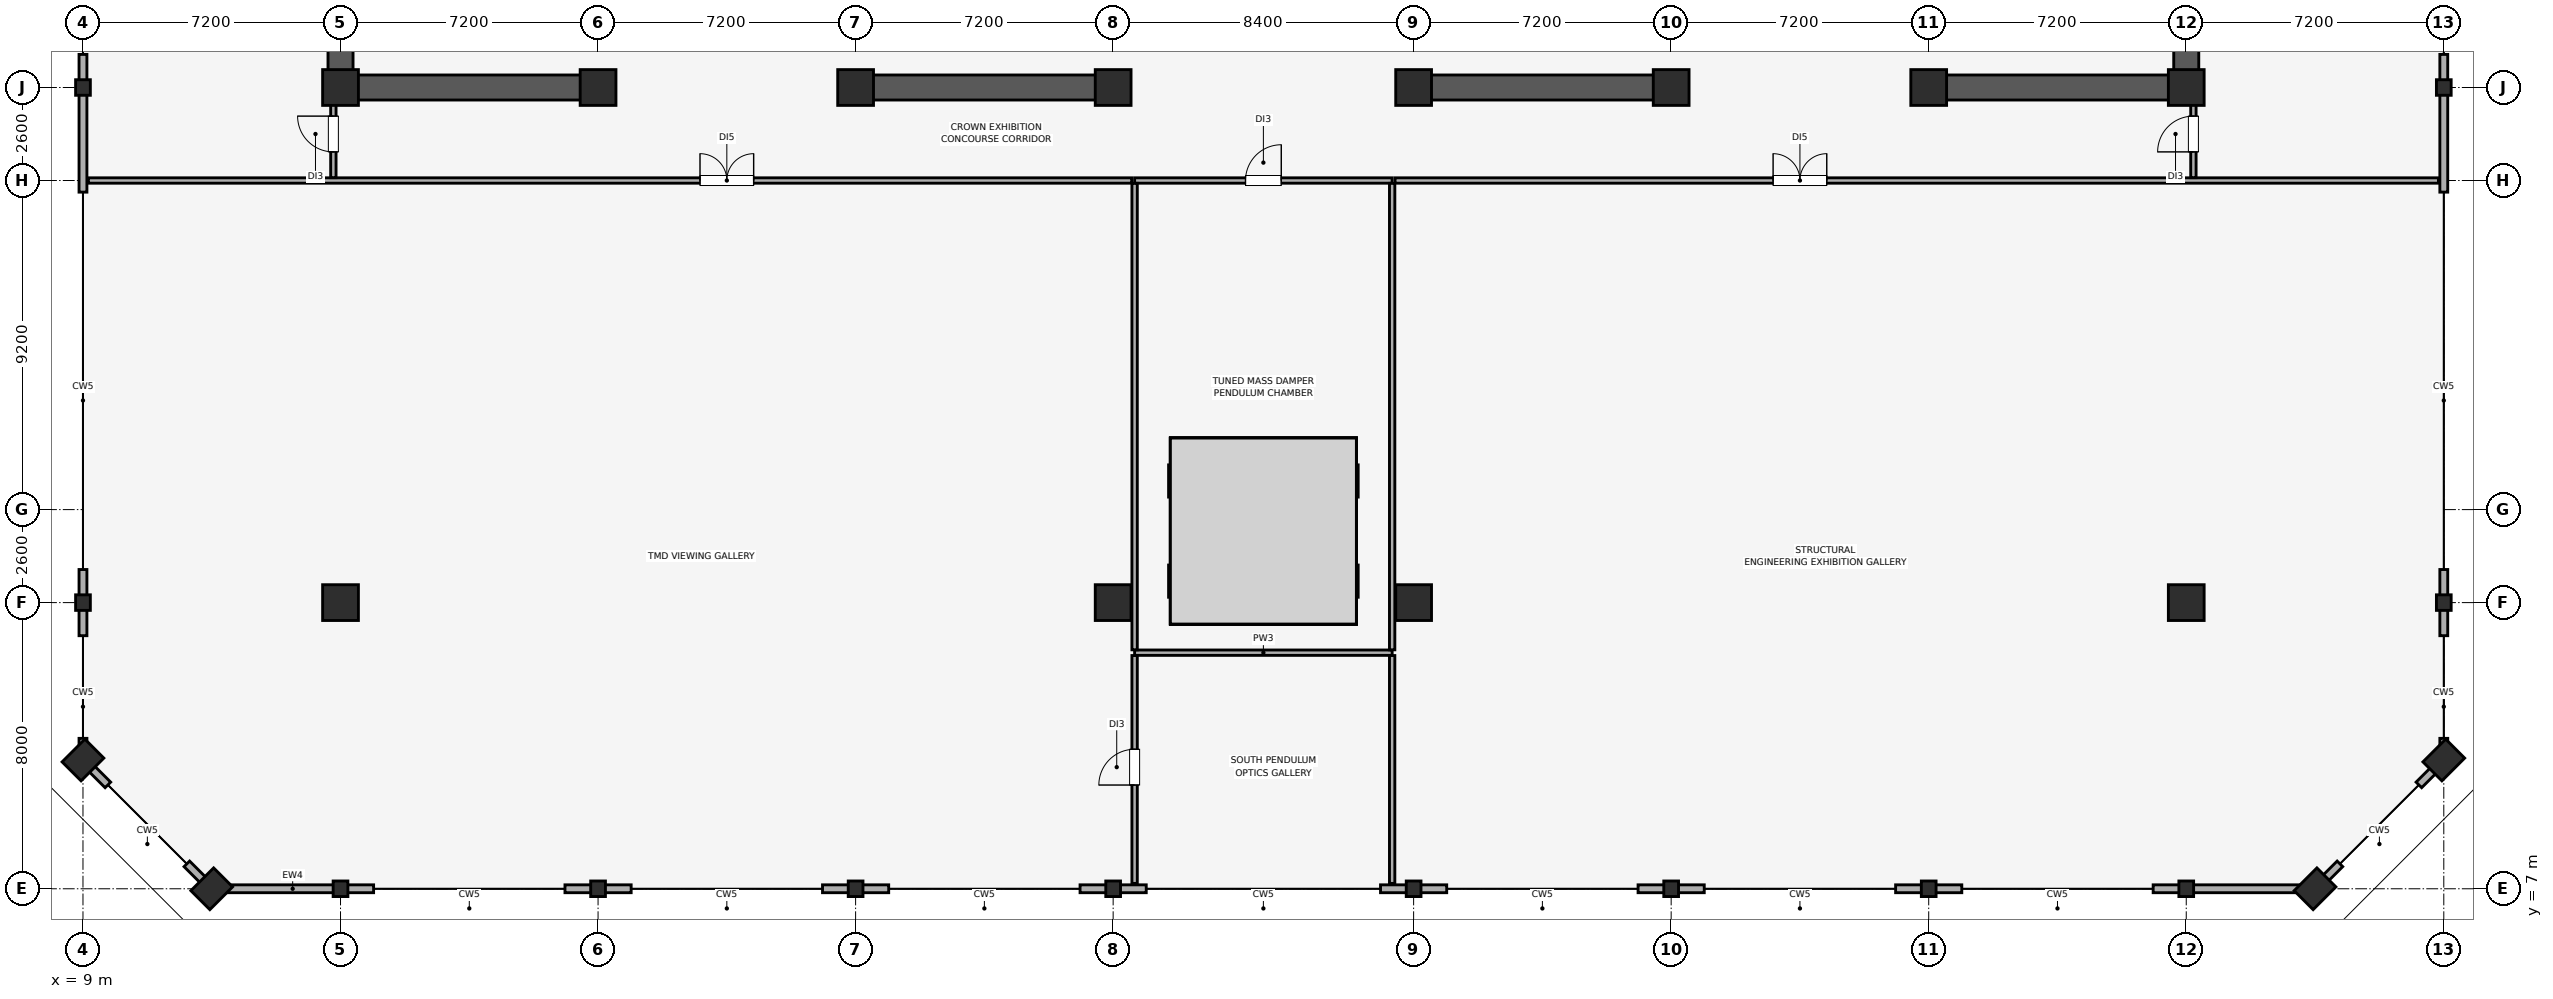
"""IFC4 building model, lengths in metres.
Left out: names, types, materials, properties, quantities, classifications, styles, units other than length and angle.
Written with IfcOpenShell. Run it as: python <this file> out.ifc"""

import sys

from ifc_helpers import new_model, si_unit, direction, frame, frame_2d, origin, origin_2d, place, context, subcontext, project, spatial, rectangle, i_section, extrude, element, fill, save


model = new_model("IFC4")
c1 = context("Model", 3, precision=1e-05, world=origin(), true_north=direction((0.0, 1.0)))
c2 = subcontext(c1, "Body", "Model", "MODEL_VIEW")
j1 = project(units=[si_unit("LENGTHUNIT", "METRE"), si_unit("PLANEANGLEUNIT", "RADIAN")], contexts=[c1])
p1 = place(None, origin())
s1 = spatial("IfcSite", under=j1, at=p1, CompositionType="ELEMENT")
p2 = place(p1, origin())
s2 = spatial("IfcBuilding", under=s1, at=p2, CompositionType="ELEMENT")
p3 = place(p2, frame((0.0, 0.0, 294.7)))
s3 = spatial("IfcBuildingStorey", under=s2, at=p3, CompositionType="ELEMENT", Elevation=294.7)
for number, where, z_axis, x_axis in (
    (1, (16.2, 7.0, 0.0), (0.0, 0.0, 1.0), (1.0, 0.0, 0.0)),
    (2, (23.4, 7.0, 0.0), (0.0, 0.0, 1.0), (1.0, 0.0, 0.0)),
    (3, (30.6, 7.0, 0.0), (0.0, 0.0, 1.0), (1.0, 0.0, 0.0)),
    (4, (37.8, 7.0, 0.0), (0.0, 0.0, 1.0), (1.0, 0.0, 0.0)),
    (5, (46.2, 7.0, 0.0), (0.0, 0.0, 1.0), (1.0, 0.0, 0.0)),
    (6, (53.4, 7.0, 0.0), (0.0, 0.0, 1.0), (1.0, 0.0, 0.0)),
    (7, (60.6, 7.0, 0.0), (0.0, 0.0, 1.0), (1.0, 0.0, 0.0)),
    (8, (67.8, 7.0, 0.0), (0.0, 0.0, 1.0), (1.0, 0.0, 0.0)),
    (9, (9.0, 15.0, 0.0), (0.0, 0.0, 1.0), (1.0, 0.0, 0.0)),
    (10, (75.0, 15.0, 0.0), (0.0, 0.0, 1.0), (1.0, 0.0, 0.0)),
    (11, (9.0, 29.4, 0.0), (0.0, 0.0, 1.0), (1.0, 0.0, 0.0)),
    (12, (75.0, 29.4, 0.0), (0.0, 0.0, 1.0), (1.0, 0.0, 0.0)),
):
    element("IfcColumn", number, at=place(p3, frame(where, z_axis=z_axis, x_axis=x_axis)), inside=s3, PredefinedType="COLUMN", context=c2, shape_type="SweptSolid", body=[
        extrude(i_section(OverallWidth=0.412, OverallDepth=0.435, WebThickness=0.036, FlangeThickness=0.056, FilletRadius=0.015, at=origin_2d()), origin(), (0.0, 0.0, 1.0), 5.12),
    ])
for number, where, z_axis, x_axis in (
    (13, (12.6, 7.0, 0.0), (0.0, 0.0, 1.0), (0.707, 0.707, 0.0)),
    (14, (71.4, 7.0, 0.0), (0.0, 0.0, 1.0), (0.707, 0.707, 0.0)),
    (15, (75.0, 10.6, 0.0), (0.0, 0.0, 1.0), (0.707, 0.707, 0.0)),
    (16, (9.0, 10.6, 0.0), (0.0, 0.0, 1.0), (0.707, 0.707, 0.0)),
):
    element("IfcColumn", number, at=place(p3, frame(where, z_axis=z_axis, x_axis=x_axis)), inside=s3, PredefinedType="PILASTER", context=c2, shape_type="SweptSolid", body=[
        extrude(rectangle(XDim=0.9, YDim=0.75, at=origin_2d()), origin(), (0.0, 0.0, 1.0), 5.12),
    ])
for number, where, z_axis, x_axis in (
    (17, (16.2, 15.0, 0.0), (0.0, 0.0, 1.0), (1.0, 0.0, 0.0)),
    (18, (37.8, 15.0, 0.0), (0.0, 0.0, 1.0), (1.0, 0.0, 0.0)),
    (19, (46.2, 15.0, 0.0), (0.0, 0.0, 1.0), (1.0, 0.0, 0.0)),
    (20, (67.8, 15.0, 0.0), (0.0, 0.0, 1.0), (1.0, 0.0, 0.0)),
    (21, (16.2, 29.4, 0.0), (0.0, 0.0, 1.0), (1.0, 0.0, 0.0)),
    (22, (23.4, 29.4, 0.0), (0.0, 0.0, 1.0), (1.0, 0.0, 0.0)),
    (23, (30.6, 29.4, 0.0), (0.0, 0.0, 1.0), (1.0, 0.0, 0.0)),
    (24, (37.8, 29.4, 0.0), (0.0, 0.0, 1.0), (1.0, 0.0, 0.0)),
    (25, (46.2, 29.4, 0.0), (0.0, 0.0, 1.0), (1.0, 0.0, 0.0)),
    (26, (53.4, 29.4, 0.0), (0.0, 0.0, 1.0), (1.0, 0.0, 0.0)),
    (27, (60.6, 29.4, 0.0), (0.0, 0.0, 1.0), (1.0, 0.0, 0.0)),
    (28, (67.8, 29.4, 0.0), (0.0, 0.0, 1.0), (1.0, 0.0, 0.0)),
):
    element("IfcColumn", number, at=place(p3, frame(where, z_axis=z_axis, x_axis=x_axis)), inside=s3, PredefinedType="COLUMN", context=c2, shape_type="SweptSolid", body=[
        extrude(rectangle(XDim=1.0, YDim=1.0, at=origin_2d()), origin(), (0.0, 0.0, 1.0), 5.12),
    ])
p4 = place(p3, frame((12.6, 7.0, 0.0), z_axis=(0.0, 0.0, 1.0), x_axis=(1.0, 0.0, 0.0)))
e29 = element("IfcWall", 29, at=p4, inside=s3, PredefinedType="SOLIDWALL", context=c2, shape_type="SweptSolid", body=[
    extrude(rectangle(XDim=4.525, YDim=0.22, at=frame_2d((2.262, 0.0))), origin(), (0.0, 0.0, 1.0), 4.32),
])
for number, where, z_axis, x_axis in (
    (30, (22.475, 7.0, 0.0), (0.0, 0.0, 1.0), (1.0, 0.0, 0.0)),
    (31, (29.675, 7.0, 0.0), (0.0, 0.0, 1.0), (1.0, 0.0, 0.0)),
):
    element("IfcWall", number, at=place(p3, frame(where, z_axis=z_axis, x_axis=x_axis)), inside=s3, PredefinedType="SOLIDWALL", context=c2, shape_type="SweptSolid", body=[
        extrude(rectangle(XDim=1.85, YDim=0.22, at=frame_2d((0.925, 0.0))), origin(), (0.0, 0.0, 1.0), 4.32),
    ])
for number, where, z_axis, x_axis in (
    (32, (36.875, 7.0, 0.0), (0.0, 0.0, 1.0), (1.0, 0.0, 0.0)),
    (33, (45.275, 7.0, 0.0), (0.0, 0.0, 1.0), (1.0, 0.0, 0.0)),
):
    element("IfcWall", number, at=place(p3, frame(where, z_axis=z_axis, x_axis=x_axis)), inside=s3, PredefinedType="SOLIDWALL", context=c2, shape_type="SweptSolid", body=[
        extrude(rectangle(XDim=1.85, YDim=0.22, at=frame_2d((0.925, 0.0))), origin(), (0.0, 0.0, 1.0), 4.32),
    ])
for number, where, z_axis, x_axis in (
    (34, (52.475, 7.0, 0.0), (0.0, 0.0, 1.0), (1.0, 0.0, 0.0)),
    (35, (59.675, 7.0, 0.0), (0.0, 0.0, 1.0), (1.0, 0.0, 0.0)),
):
    element("IfcWall", number, at=place(p3, frame(where, z_axis=z_axis, x_axis=x_axis)), inside=s3, PredefinedType="SOLIDWALL", context=c2, shape_type="SweptSolid", body=[
        extrude(rectangle(XDim=1.85, YDim=0.22, at=frame_2d((0.925, 0.0))), origin(), (0.0, 0.0, 1.0), 4.32),
    ])
p5 = place(p3, frame((66.875, 7.0, 0.0), z_axis=(0.0, 0.0, 1.0), x_axis=(1.0, 0.0, 0.0)))
e36 = element("IfcWall", 36, at=p5, inside=s3, PredefinedType="SOLIDWALL", context=c2, shape_type="SweptSolid", body=[
    extrude(rectangle(XDim=4.525, YDim=0.22, at=frame_2d((2.262, 0.0))), origin(), (0.0, 0.0, 1.0), 4.32),
])
for number, where, z_axis, x_axis in (
    (37, (71.4, 7.0, 0.0), (0.0, 0.0, 1.0), (0.707, 0.707, 0.0)),
    (38, (74.303, 9.904, 0.0), (0.0, 0.0, 1.0), (0.707, 0.707, 0.0)),
):
    element("IfcWall", number, at=place(p3, frame(where, z_axis=z_axis, x_axis=x_axis)), inside=s3, PredefinedType="SOLIDWALL", context=c2, shape_type="SweptSolid", body=[
        extrude(rectangle(XDim=0.985, YDim=0.22, at=frame_2d((0.493, 0.0))), origin(), (0.0, 0.0, 1.0), 4.32),
    ])
p6 = place(p3, frame((75.0, 10.6, 0.0), z_axis=(0.0, 0.0, 1.0), x_axis=(0.0, 1.0, 0.0)))
e39 = element("IfcWall", 39, at=p6, inside=s3, PredefinedType="SOLIDWALL", context=c2, shape_type="SweptSolid", body=[
    extrude(rectangle(XDim=0.605, YDim=0.22, at=frame_2d((0.302, 0.0))), origin(), (0.0, 0.0, 1.0), 5.12),
])
p7 = place(p3, frame((75.0, 14.075, 0.0), z_axis=(0.0, 0.0, 1.0), x_axis=(0.0, 1.0, 0.0)))
e40 = element("IfcWall", 40, at=p7, inside=s3, PredefinedType="SOLIDWALL", context=c2, shape_type="SweptSolid", body=[
    extrude(rectangle(XDim=1.85, YDim=0.22, at=frame_2d((0.925, 0.0))), origin(), (0.0, 0.0, 1.0), 4.32),
])
for number, where, z_axis, x_axis in (
    (41, (75.0, 26.475, 0.0), (0.0, 0.0, 1.0), (0.0, 1.0, 0.0)),
    (42, (9.0, 30.325, 0.0), (0.0, 0.0, 1.0), (0.0, -1.0, 0.0)),
):
    element("IfcWall", number, at=place(p3, frame(where, z_axis=z_axis, x_axis=x_axis)), inside=s3, PredefinedType="SOLIDWALL", context=c2, shape_type="SweptSolid", body=[
        extrude(rectangle(XDim=3.85, YDim=0.22, at=frame_2d((1.925, 0.0))), origin(), (0.0, 0.0, 1.0), 4.32),
    ])
p8 = place(p3, frame((9.0, 15.925, 0.0), z_axis=(0.0, 0.0, 1.0), x_axis=(0.0, -1.0, 0.0)))
e43 = element("IfcWall", 43, at=p8, inside=s3, PredefinedType="SOLIDWALL", context=c2, shape_type="SweptSolid", body=[
    extrude(rectangle(XDim=1.85, YDim=0.22, at=frame_2d((0.925, 0.0))), origin(), (0.0, 0.0, 1.0), 4.32),
])
p9 = place(p3, frame((9.0, 11.205, 0.0), z_axis=(0.0, 0.0, 1.0), x_axis=(0.0, -1.0, 0.0)))
e44 = element("IfcWall", 44, at=p9, inside=s3, PredefinedType="SOLIDWALL", context=c2, shape_type="SweptSolid", body=[
    extrude(rectangle(XDim=0.605, YDim=0.22, at=frame_2d((0.302, 0.0))), origin(), (0.0, 0.0, 1.0), 5.12),
])
for number, where, z_axis, x_axis in (
    (45, (9.0, 10.6, 0.0), (0.0, 0.0, 1.0), (0.707, -0.707, 0.0)),
    (46, (11.904, 7.697, 0.0), (0.0, 0.0, 1.0), (0.707, -0.707, 0.0)),
):
    element("IfcWall", number, at=place(p3, frame(where, z_axis=z_axis, x_axis=x_axis)), inside=s3, PredefinedType="SOLIDWALL", context=c2, shape_type="SweptSolid", body=[
        extrude(rectangle(XDim=0.985, YDim=0.22, at=frame_2d((0.493, 0.0))), origin(), (0.0, 0.0, 1.0), 4.32),
    ])
for number, where, z_axis, x_axis in (
    (47, (16.2, 29.4, 0.0), (0.0, 0.0, 1.0), (0.0, 1.0, 0.0)),
    (48, (67.8, 29.4, 0.0), (0.0, 0.0, 1.0), (0.0, 1.0, 0.0)),
):
    element("IfcWall", number, at=place(p3, frame(where, z_axis=z_axis, x_axis=x_axis)), inside=s3, PredefinedType="SHEAR", context=c2, shape_type="SweptSolid", body=[
        extrude(rectangle(XDim=19.2, YDim=0.7, at=frame_2d((9.6, 0.0))), origin(), (0.0, 0.0, 1.0), 5.12),
    ])
p10 = place(p3, frame((16.555, 29.4, 0.0), z_axis=(0.0, 0.0, 1.0), x_axis=(1.0, 0.0, 0.0)))
e49 = element("IfcWall", 49, at=p10, inside=s3, PredefinedType="SHEAR", context=c2, shape_type="SweptSolid", body=[
    extrude(rectangle(XDim=7.045, YDim=0.7, at=frame_2d((3.522, 0.0))), origin(), (0.0, 0.0, 1.0), 5.12),
])
for number, where, z_axis, x_axis in (
    (50, (30.4, 29.4, 0.0), (0.0, 0.0, 1.0), (1.0, 0.0, 0.0)),
    (51, (46.0, 29.4, 0.0), (0.0, 0.0, 1.0), (1.0, 0.0, 0.0)),
):
    element("IfcWall", number, at=place(p3, frame(where, z_axis=z_axis, x_axis=x_axis)), inside=s3, PredefinedType="SHEAR", context=c2, shape_type="SweptSolid", body=[
        extrude(rectangle(XDim=7.6, YDim=0.7, at=frame_2d((3.8, 0.0))), origin(), (0.0, 0.0, 1.0), 5.12),
    ])
p11 = place(p3, frame((60.4, 29.4, 0.0), z_axis=(0.0, 0.0, 1.0), x_axis=(1.0, 0.0, 0.0)))
e52 = element("IfcWall", 52, at=p11, inside=s3, PredefinedType="SHEAR", context=c2, shape_type="SweptSolid", body=[
    extrude(rectangle(XDim=7.045, YDim=0.7, at=frame_2d((3.522, 0.0))), origin(), (0.0, 0.0, 1.0), 5.12),
])
p12 = place(p3, frame((38.4, 13.6, 0.0), z_axis=(0.0, 0.0, 1.0), x_axis=(1.0, 0.0, 0.0)))
e53 = element("IfcWall", 53, at=p12, inside=s3, PredefinedType="PARTITIONING", context=c2, shape_type="SweptSolid", body=[
    extrude(rectangle(XDim=7.2, YDim=0.15, at=frame_2d((3.6, 0.0))), origin(), (0.0, 0.0, 1.0), 5.12),
])
p13 = place(p3, frame((38.4, 26.8, 0.0), z_axis=(0.0, 0.0, 1.0), x_axis=(1.0, 0.0, 0.0)))
e54 = element("IfcWall", 54, at=p13, inside=s3, PredefinedType="PARTITIONING", context=c2, shape_type="SweptSolid", body=[
    extrude(rectangle(XDim=7.2, YDim=0.15, at=frame_2d((3.6, 0.0))), origin(), (0.0, 0.0, 1.0), 5.12),
])
p14 = place(p13, frame((3.1, 0.0, 0.0)))
e55 = element("IfcOpeningElement", 55, at=p14, cuts=e54, PredefinedType="OPENING", context=c2, shape_type="SweptSolid", body=[
    extrude(rectangle(XDim=1.0, YDim=2.15, at=frame_2d((0.5, 1.075))), frame((0.0, 0.085, 0.0), z_axis=(0.0, -1.0, 0.0), x_axis=(1.0, 0.0, 0.0)), (0.0, 0.0, 1.0), 0.17),
])
for number, where, z_axis, x_axis in (
    (56, (38.4, 13.68, 0.0), (0.0, 0.0, 1.0), (0.0, 1.0, 0.0)),
    (57, (45.6, 13.68, 0.0), (0.0, 0.0, 1.0), (0.0, 1.0, 0.0)),
):
    element("IfcWall", number, at=place(p3, frame(where, z_axis=z_axis, x_axis=x_axis)), inside=s3, PredefinedType="PARTITIONING", context=c2, shape_type="SweptSolid", body=[
        extrude(rectangle(XDim=13.04, YDim=0.15, at=frame_2d((6.52, 0.0))), origin(), (0.0, 0.0, 1.0), 5.12),
    ])
p15 = place(p3, frame((9.15, 26.8, 0.0), z_axis=(0.0, 0.0, 1.0), x_axis=(1.0, 0.0, 0.0)))
e58 = element("IfcWall", 58, at=p15, inside=s3, PredefinedType="PARTITIONING", context=c2, shape_type="SweptSolid", body=[
    extrude(rectangle(XDim=29.17, YDim=0.15, at=frame_2d((14.585, 0.0))), origin(), (0.0, 0.0, 1.0), 5.12),
])
p16 = place(p15, frame((17.1, 0.0, 0.0)))
e59 = element("IfcOpeningElement", 59, at=p16, cuts=e58, PredefinedType="OPENING", context=c2, shape_type="SweptSolid", body=[
    extrude(rectangle(XDim=1.5, YDim=2.25, at=frame_2d((0.75, 1.125))), frame((0.0, 0.085, 0.0), z_axis=(0.0, -1.0, 0.0), x_axis=(1.0, 0.0, 0.0)), (0.0, 0.0, 1.0), 0.17),
])
p17 = place(p3, frame((38.4, 7.15, 0.0), z_axis=(0.0, 0.0, 1.0), x_axis=(0.0, 1.0, 0.0)))
e60 = element("IfcWall", 60, at=p17, inside=s3, PredefinedType="PARTITIONING", context=c2, shape_type="SweptSolid", body=[
    extrude(rectangle(XDim=6.37, YDim=0.15, at=frame_2d((3.185, 0.0))), origin(), (0.0, 0.0, 1.0), 5.12),
])
p18 = place(p17, frame((2.75, 0.0, 0.0)))
e61 = element("IfcOpeningElement", 61, at=p18, cuts=e60, PredefinedType="OPENING", context=c2, shape_type="SweptSolid", body=[
    extrude(rectangle(XDim=1.0, YDim=2.15, at=frame_2d((0.5, 1.075))), frame((0.0, 0.085, 0.0), z_axis=(0.0, -1.0, 0.0), x_axis=(1.0, 0.0, 0.0)), (0.0, 0.0, 1.0), 0.17),
])
p19 = place(p3, frame((45.6, 7.15, 0.0), z_axis=(0.0, 0.0, 1.0), x_axis=(0.0, 1.0, 0.0)))
e62 = element("IfcWall", 62, at=p19, inside=s3, PredefinedType="PARTITIONING", context=c2, shape_type="SweptSolid", body=[
    extrude(rectangle(XDim=6.37, YDim=0.15, at=frame_2d((3.185, 0.0))), origin(), (0.0, 0.0, 1.0), 5.12),
])
p20 = place(p3, frame((45.68, 26.8, 0.0), z_axis=(0.0, 0.0, 1.0), x_axis=(1.0, 0.0, 0.0)))
e63 = element("IfcWall", 63, at=p20, inside=s3, PredefinedType="PARTITIONING", context=c2, shape_type="SweptSolid", body=[
    extrude(rectangle(XDim=29.17, YDim=0.15, at=frame_2d((14.585, 0.0))), origin(), (0.0, 0.0, 1.0), 5.12),
])
p21 = place(p20, frame((10.57, 0.0, 0.0)))
e64 = element("IfcOpeningElement", 64, at=p21, cuts=e63, PredefinedType="OPENING", context=c2, shape_type="SweptSolid", body=[
    extrude(rectangle(XDim=1.5, YDim=2.25, at=frame_2d((0.75, 1.125))), frame((0.0, 0.085, 0.0), z_axis=(0.0, -1.0, 0.0), x_axis=(1.0, 0.0, 0.0)), (0.0, 0.0, 1.0), 0.17),
])
p22 = place(p3, frame((16.0, 26.88, 0.0), z_axis=(0.0, 0.0, 1.0), x_axis=(0.0, 1.0, 0.0)))
e65 = element("IfcWall", 65, at=p22, inside=s3, PredefinedType="PARTITIONING", context=c2, shape_type="SweptSolid", body=[
    extrude(rectangle(XDim=2.51, YDim=0.15, at=frame_2d((1.255, 0.0))), origin(), (0.0, 0.0, 1.0), 4.76),
])
p23 = place(p22, frame((0.72, 0.0, 0.0)))
e66 = element("IfcOpeningElement", 66, at=p23, cuts=e65, PredefinedType="OPENING", context=c2, shape_type="SweptSolid", body=[
    extrude(rectangle(XDim=1.0, YDim=2.15, at=frame_2d((0.5, 1.075))), frame((0.0, 0.085, 0.0), z_axis=(0.0, -1.0, 0.0), x_axis=(1.0, 0.0, 0.0)), (0.0, 0.0, 1.0), 0.17),
])
p24 = place(p3, frame((68.0, 26.88, 0.0), z_axis=(0.0, 0.0, 1.0), x_axis=(0.0, 1.0, 0.0)))
e67 = element("IfcWall", 67, at=p24, inside=s3, PredefinedType="PARTITIONING", context=c2, shape_type="SweptSolid", body=[
    extrude(rectangle(XDim=2.51, YDim=0.15, at=frame_2d((1.255, 0.0))), origin(), (0.0, 0.0, 1.0), 4.76),
])
p25 = place(p24, frame((0.72, 0.0, 0.0)))
e68 = element("IfcOpeningElement", 68, at=p25, cuts=e67, PredefinedType="OPENING", context=c2, shape_type="SweptSolid", body=[
    extrude(rectangle(XDim=1.0, YDim=2.15, at=frame_2d((0.5, 1.075))), frame((0.0, 0.085, 0.0), z_axis=(0.0, -1.0, 0.0), x_axis=(1.0, 0.0, 0.0)), (0.0, 0.0, 1.0), 0.17),
])
p26 = place(p14, origin())
e69 = element("IfcDoor", 69, at=p26, inside=s3, OperationType="SINGLE_SWING_RIGHT", PredefinedType="DOOR", context=c2, shape_type="SweptSolid", body=[
    extrude(rectangle(XDim=1.0, YDim=2.15, at=frame_2d((0.5, 1.075))), frame((0.0, 0.025, 0.0), z_axis=(0.0, -1.0, 0.0), x_axis=(1.0, 0.0, 0.0)), (0.0, 0.0, 1.0), 0.05),
])
fill(e55, e69)
p27 = place(p16, origin())
e70 = element("IfcDoor", 70, at=p27, inside=s3, OperationType="DOUBLE_DOOR_SINGLE_SWING", PredefinedType="DOOR", context=c2, shape_type="SweptSolid", body=[
    extrude(rectangle(XDim=1.5, YDim=2.25, at=frame_2d((0.75, 1.125))), frame((0.0, 0.025, 0.0), z_axis=(0.0, -1.0, 0.0), x_axis=(1.0, 0.0, 0.0)), (0.0, 0.0, 1.0), 0.05),
])
fill(e59, e70)
p28 = place(p18, origin())
e71 = element("IfcDoor", 71, at=p28, inside=s3, OperationType="SINGLE_SWING_LEFT", PredefinedType="DOOR", context=c2, shape_type="SweptSolid", body=[
    extrude(rectangle(XDim=1.0, YDim=2.15, at=frame_2d((0.5, 1.075))), frame((0.0, 0.025, 0.0), z_axis=(0.0, -1.0, 0.0), x_axis=(1.0, 0.0, 0.0)), (0.0, 0.0, 1.0), 0.05),
])
fill(e61, e71)
p29 = place(p21, origin())
e72 = element("IfcDoor", 72, at=p29, inside=s3, OperationType="DOUBLE_DOOR_SINGLE_SWING", PredefinedType="DOOR", context=c2, shape_type="SweptSolid", body=[
    extrude(rectangle(XDim=1.5, YDim=2.25, at=frame_2d((0.75, 1.125))), frame((0.0, 0.025, 0.0), z_axis=(0.0, -1.0, 0.0), x_axis=(1.0, 0.0, 0.0)), (0.0, 0.0, 1.0), 0.05),
])
fill(e64, e72)
p30 = place(p23, origin())
e73 = element("IfcDoor", 73, at=p30, inside=s3, OperationType="SINGLE_SWING_RIGHT", PredefinedType="DOOR", context=c2, shape_type="SweptSolid", body=[
    extrude(rectangle(XDim=1.0, YDim=2.15, at=frame_2d((0.5, 1.075))), frame((0.0, 0.025, 0.0), z_axis=(0.0, -1.0, 0.0), x_axis=(1.0, 0.0, 0.0)), (0.0, 0.0, 1.0), 0.05),
])
fill(e66, e73)
p31 = place(p25, origin())
e74 = element("IfcDoor", 74, at=p31, inside=s3, OperationType="SINGLE_SWING_LEFT", PredefinedType="DOOR", context=c2, shape_type="SweptSolid", body=[
    extrude(rectangle(XDim=1.0, YDim=2.15, at=frame_2d((0.5, 1.075))), frame((0.0, 0.025, 0.0), z_axis=(0.0, -1.0, 0.0), x_axis=(1.0, 0.0, 0.0)), (0.0, 0.0, 1.0), 0.05),
])
fill(e68, e74)
save(model, sys.argv[1])
